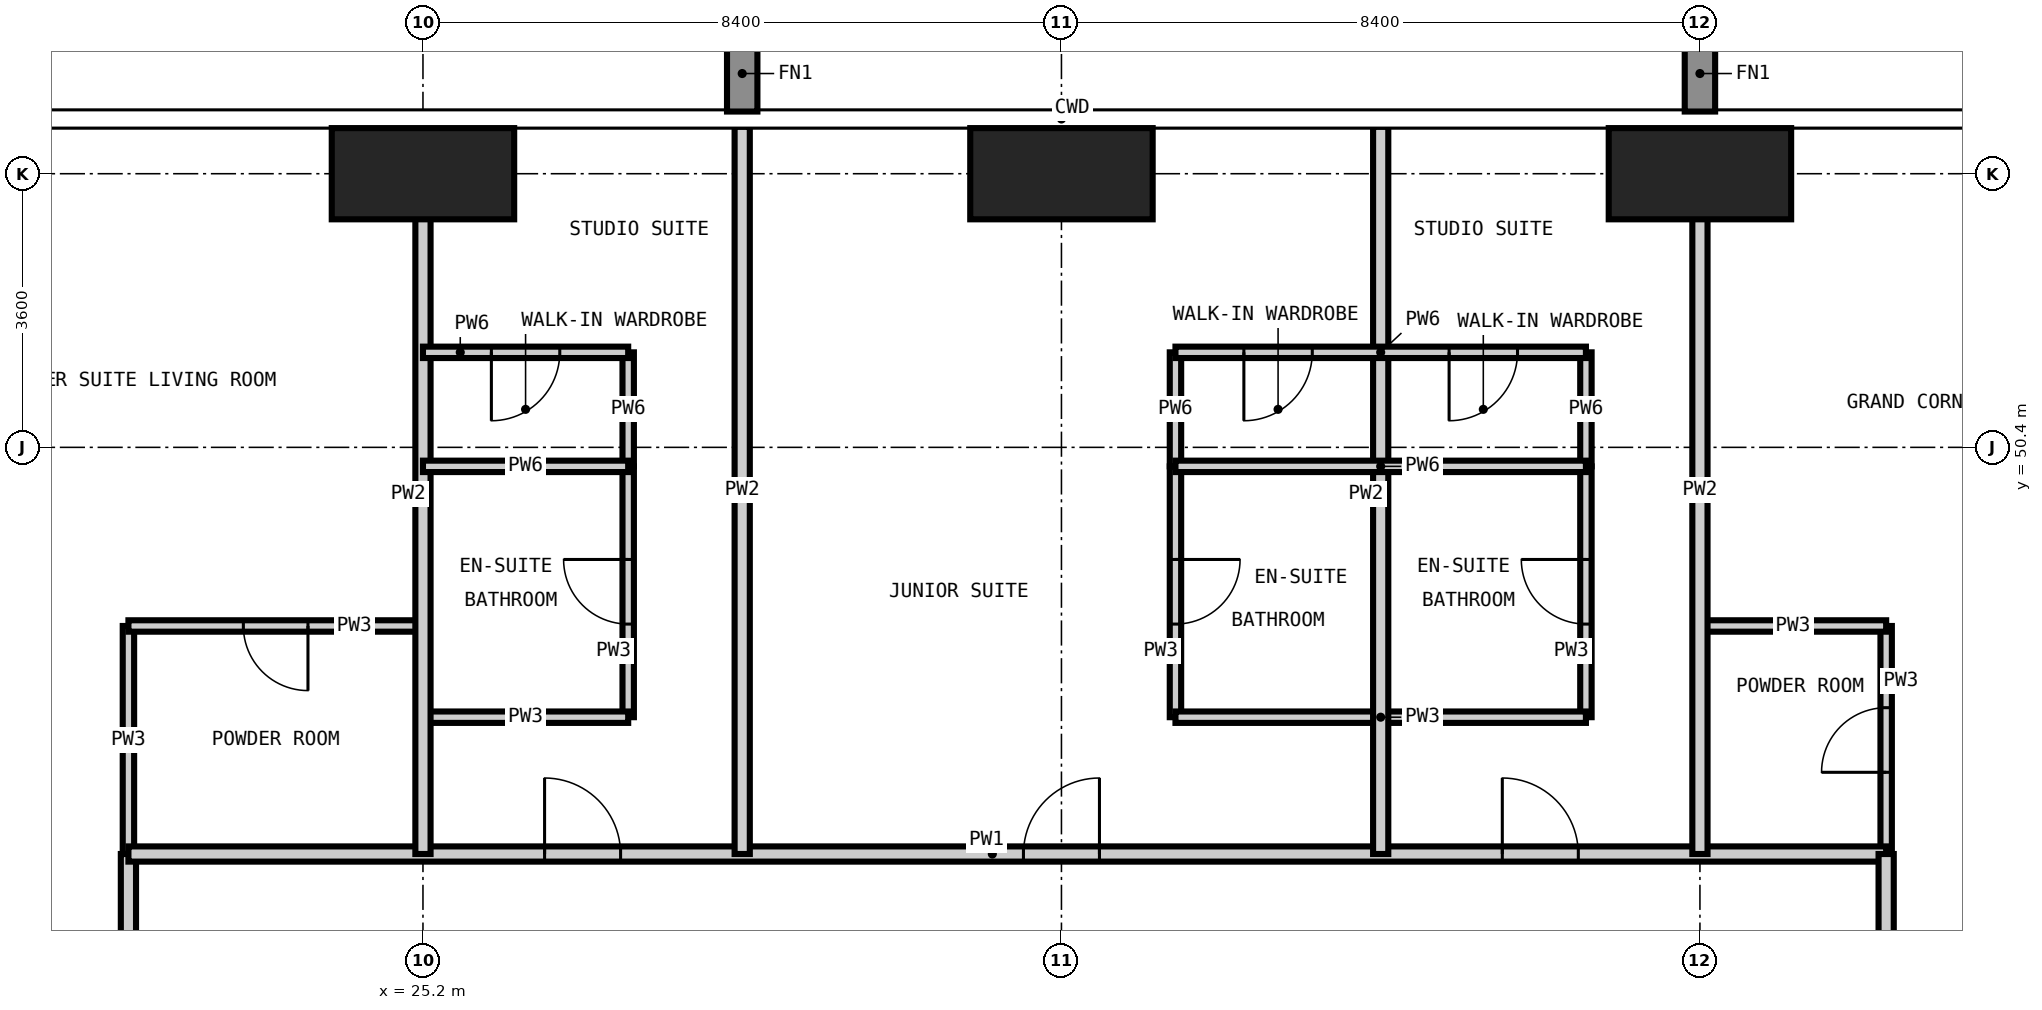
"""IFC4 building model, lengths in metres.
Left out: names, types, materials, properties, quantities, classifications, styles, units other than length and angle.
Written with IfcOpenShell. Run it as: python <this file> out.ifc"""

import sys

from ifc_helpers import new_model, si_unit, direction, frame, frame_2d, origin, origin_2d, place, context, subcontext, project, spatial, rectangle, extrude, element, fill, save


model = new_model("IFC4")
c1 = context("Model", 3, precision=1e-05, world=origin(), true_north=direction((0.0, 1.0)))
c2 = subcontext(c1, "Body", "Model", "MODEL_VIEW")
j1 = project(units=[si_unit("LENGTHUNIT", "METRE"), si_unit("PLANEANGLEUNIT", "RADIAN")], contexts=[c1])
p1 = place(None, origin())
s1 = spatial("IfcSite", under=j1, at=p1, CompositionType="ELEMENT")
p2 = place(p1, origin())
s2 = spatial("IfcBuilding", under=s1, at=p2, CompositionType="ELEMENT")
p3 = place(p2, frame((0.0, 0.0, 229.5)))
s3 = spatial("IfcBuildingStorey", under=s2, at=p3, CompositionType="ELEMENT", Elevation=229.5)
for number, where, z_axis, x_axis in (
    (1, (25.2, 54.0, -0.35), (0.0, 0.0, 1.0), (1.0, 0.0, 0.0)),
    (2, (33.6, 54.0, -0.35), (0.0, 0.0, 1.0), (1.0, 0.0, 0.0)),
    (3, (42.0, 54.0, -0.35), (0.0, 0.0, 1.0), (1.0, 0.0, 0.0)),
):
    element("IfcColumn", number, at=place(p3, frame(where, z_axis=z_axis, x_axis=x_axis)), inside=s3, PredefinedType="COLUMN", context=c2, shape_type="SweptSolid", body=[
        extrude(rectangle(XDim=2.4, YDim=1.2, at=origin_2d()), origin(), (0.0, 0.0, 1.0), 3.9),
    ])
p4 = place(p3, frame((21.325, 45.05, 0.0), z_axis=(0.0, 0.0, 1.0), x_axis=(0.0, 1.0, 0.0)))
e4 = element("IfcWall", 4, at=p4, inside=s3, PredefinedType="PARTITIONING", context=c2, shape_type="SweptSolid", body=[
    extrude(rectangle(XDim=3.0, YDim=0.15, at=frame_2d((1.5, 0.0))), origin(), (0.0, 0.0, 1.0), 3.55),
])
p5 = place(p3, frame((27.9, 46.85, 0.0), z_axis=(0.0, 0.0, 1.0), x_axis=(0.0, 1.0, 0.0)))
e5 = element("IfcWall", 5, at=p5, inside=s3, PredefinedType="PARTITIONING", context=c2, shape_type="SweptSolid", body=[
    extrude(rectangle(XDim=3.3, YDim=0.15, at=frame_2d((1.65, 0.0))), origin(), (0.0, 0.0, 1.0), 3.55),
])
p6 = place(p5, frame((1.225, 0.0, 0.0)))
e6 = element("IfcOpeningElement", 6, at=p6, cuts=e5, PredefinedType="OPENING", context=c2, shape_type="SweptSolid", body=[
    extrude(rectangle(XDim=0.85, YDim=2.1, at=frame_2d((0.425, 1.05))), frame((0.0, 0.085, 0.0), z_axis=(0.0, -1.0, 0.0), x_axis=(1.0, 0.0, 0.0)), (0.0, 0.0, 1.0), 0.17),
])
p7 = place(p3, frame((35.1, 46.85, 0.0), z_axis=(0.0, 0.0, 1.0), x_axis=(0.0, 1.0, 0.0)))
e7 = element("IfcWall", 7, at=p7, inside=s3, PredefinedType="PARTITIONING", context=c2, shape_type="SweptSolid", body=[
    extrude(rectangle(XDim=3.3, YDim=0.15, at=frame_2d((1.65, 0.0))), origin(), (0.0, 0.0, 1.0), 3.55),
])
p8 = place(p7, frame((1.225, 0.0, 0.0)))
e8 = element("IfcOpeningElement", 8, at=p8, cuts=e7, PredefinedType="OPENING", context=c2, shape_type="SweptSolid", body=[
    extrude(rectangle(XDim=0.85, YDim=2.1, at=frame_2d((0.425, 1.05))), frame((0.0, 0.085, 0.0), z_axis=(0.0, -1.0, 0.0), x_axis=(1.0, 0.0, 0.0)), (0.0, 0.0, 1.0), 0.17),
])
p9 = place(p3, frame((40.5, 46.85, 0.0), z_axis=(0.0, 0.0, 1.0), x_axis=(0.0, 1.0, 0.0)))
e9 = element("IfcWall", 9, at=p9, inside=s3, PredefinedType="PARTITIONING", context=c2, shape_type="SweptSolid", body=[
    extrude(rectangle(XDim=3.3, YDim=0.15, at=frame_2d((1.65, 0.0))), origin(), (0.0, 0.0, 1.0), 3.55),
])
p10 = place(p9, frame((1.225, 0.0, 0.0)))
e10 = element("IfcOpeningElement", 10, at=p10, cuts=e9, PredefinedType="OPENING", context=c2, shape_type="SweptSolid", body=[
    extrude(rectangle(XDim=0.85, YDim=2.1, at=frame_2d((0.425, 1.05))), frame((0.0, 0.085, 0.0), z_axis=(0.0, -1.0, 0.0), x_axis=(1.0, 0.0, 0.0)), (0.0, 0.0, 1.0), 0.17),
])
p11 = place(p3, frame((44.45, 45.05, 0.0), z_axis=(0.0, 0.0, 1.0), x_axis=(0.0, 1.0, 0.0)))
e11 = element("IfcWall", 11, at=p11, inside=s3, PredefinedType="PARTITIONING", context=c2, shape_type="SweptSolid", body=[
    extrude(rectangle(XDim=3.0, YDim=0.15, at=frame_2d((1.5, 0.0))), origin(), (0.0, 0.0, 1.0), 3.55),
])
p12 = place(p11, frame((1.075, 0.0, 0.0)))
e12 = element("IfcOpeningElement", 12, at=p12, cuts=e11, PredefinedType="OPENING", context=c2, shape_type="SweptSolid", body=[
    extrude(rectangle(XDim=0.85, YDim=2.1, at=frame_2d((0.425, 1.05))), frame((0.0, 0.085, 0.0), z_axis=(0.0, -1.0, 0.0), x_axis=(1.0, 0.0, 0.0)), (0.0, 0.0, 1.0), 0.17),
])
p13 = place(p3, frame((25.2, 46.85, 0.0), z_axis=(0.0, 0.0, 1.0), x_axis=(1.0, 0.0, 0.0)))
e13 = element("IfcWall", 13, at=p13, inside=s3, PredefinedType="PARTITIONING", context=c2, shape_type="SweptSolid", body=[
    extrude(rectangle(XDim=2.7, YDim=0.15, at=frame_2d((1.35, 0.0))), origin(), (0.0, 0.0, 1.0), 3.55),
])
p14 = place(p3, frame((35.1, 46.85, 0.0), z_axis=(0.0, 0.0, 1.0), x_axis=(1.0, 0.0, 0.0)))
e14 = element("IfcWall", 14, at=p14, inside=s3, PredefinedType="PARTITIONING", context=c2, shape_type="SweptSolid", body=[
    extrude(rectangle(XDim=5.4, YDim=0.15, at=frame_2d((2.7, 0.0))), origin(), (0.0, 0.0, 1.0), 3.55),
])
p15 = place(p3, frame((21.325, 48.05, 0.0), z_axis=(0.0, 0.0, 1.0), x_axis=(1.0, 0.0, 0.0)))
e15 = element("IfcWall", 15, at=p15, inside=s3, PredefinedType="PARTITIONING", context=c2, shape_type="SweptSolid", body=[
    extrude(rectangle(XDim=3.875, YDim=0.15, at=frame_2d((1.938, 0.0))), origin(), (0.0, 0.0, 1.0), 3.55),
])
p16 = place(p15, frame((1.512, 0.0, 0.0)))
e16 = element("IfcOpeningElement", 16, at=p16, cuts=e15, PredefinedType="OPENING", context=c2, shape_type="SweptSolid", body=[
    extrude(rectangle(XDim=0.85, YDim=2.1, at=frame_2d((0.425, 1.05))), frame((0.0, 0.085, 0.0), z_axis=(0.0, -1.0, 0.0), x_axis=(1.0, 0.0, 0.0)), (0.0, 0.0, 1.0), 0.17),
])
p17 = place(p3, frame((42.0, 48.05, 0.0), z_axis=(0.0, 0.0, 1.0), x_axis=(1.0, 0.0, 0.0)))
e17 = element("IfcWall", 17, at=p17, inside=s3, PredefinedType="PARTITIONING", context=c2, shape_type="SweptSolid", body=[
    extrude(rectangle(XDim=2.45, YDim=0.15, at=frame_2d((1.225, 0.0))), origin(), (0.0, 0.0, 1.0), 3.55),
])
p18 = place(p3, frame((21.325, 13.15, 0.0), z_axis=(0.0, 0.0, 1.0), x_axis=(0.0, 1.0, 0.0)))
e18 = element("IfcWall", 18, at=p18, inside=s3, PredefinedType="PARTITIONING", context=c2, shape_type="SweptSolid", body=[
    extrude(rectangle(XDim=31.9, YDim=0.2, at=frame_2d((15.95, 0.0))), origin(), (0.0, 0.0, 1.0), 3.55),
])
p19 = place(p18, frame((6.15, 0.0, 0.0)))
e19 = element("IfcOpeningElement", 19, at=p19, cuts=e18, PredefinedType="OPENING", context=c2, shape_type="SweptSolid", body=[
    extrude(rectangle(XDim=1.0, YDim=2.2, at=frame_2d((0.5, 1.1))), frame((0.0, 0.11, 0.0), z_axis=(0.0, -1.0, 0.0), x_axis=(1.0, 0.0, 0.0)), (0.0, 0.0, 1.0), 0.22),
])
p20 = place(p18, frame((16.95, 0.0, 0.0)))
e20 = element("IfcOpeningElement", 20, at=p20, cuts=e18, PredefinedType="OPENING", context=c2, shape_type="SweptSolid", body=[
    extrude(rectangle(XDim=1.0, YDim=2.2, at=frame_2d((0.5, 1.1))), frame((0.0, 0.11, 0.0), z_axis=(0.0, -1.0, 0.0), x_axis=(1.0, 0.0, 0.0)), (0.0, 0.0, 1.0), 0.22),
])
p21 = place(p18, frame((22.95, 0.0, 0.0)))
e21 = element("IfcOpeningElement", 21, at=p21, cuts=e18, PredefinedType="OPENING", context=c2, shape_type="SweptSolid", body=[
    extrude(rectangle(XDim=1.0, YDim=2.2, at=frame_2d((0.5, 1.1))), frame((0.0, 0.11, 0.0), z_axis=(0.0, -1.0, 0.0), x_axis=(1.0, 0.0, 0.0)), (0.0, 0.0, 1.0), 0.22),
])
p22 = place(p18, frame((1.325, 0.0, 0.0)))
e22 = element("IfcOpeningElement", 22, at=p22, cuts=e18, PredefinedType="OPENING", context=c2, shape_type="SweptSolid", body=[
    extrude(rectangle(XDim=1.0, YDim=2.2, at=frame_2d((0.5, 1.1))), frame((0.0, 0.11, 0.0), z_axis=(0.0, -1.0, 0.0), x_axis=(1.0, 0.0, 0.0)), (0.0, 0.0, 1.0), 0.22),
])
p23 = place(p18, frame((29.875, 0.0, 0.0)))
e23 = element("IfcOpeningElement", 23, at=p23, cuts=e18, PredefinedType="OPENING", context=c2, shape_type="SweptSolid", body=[
    extrude(rectangle(XDim=1.0, YDim=2.2, at=frame_2d((0.5, 1.1))), frame((0.0, 0.11, 0.0), z_axis=(0.0, -1.0, 0.0), x_axis=(1.0, 0.0, 0.0)), (0.0, 0.0, 1.0), 0.22),
])
p24 = place(p3, frame((21.325, 45.05, 0.0), z_axis=(0.0, 0.0, 1.0), x_axis=(1.0, 0.0, 0.0)))
e24 = element("IfcWall", 24, at=p24, inside=s3, PredefinedType="PARTITIONING", context=c2, shape_type="SweptSolid", body=[
    extrude(rectangle(XDim=23.125, YDim=0.2, at=frame_2d((11.562, 0.0))), origin(), (0.0, 0.0, 1.0), 3.55),
])
p25 = place(p24, frame((5.475, 0.0, 0.0)))
e25 = element("IfcOpeningElement", 25, at=p25, cuts=e24, PredefinedType="OPENING", context=c2, shape_type="SweptSolid", body=[
    extrude(rectangle(XDim=1.0, YDim=2.2, at=frame_2d((0.5, 1.1))), frame((0.0, 0.11, 0.0), z_axis=(0.0, -1.0, 0.0), x_axis=(1.0, 0.0, 0.0)), (0.0, 0.0, 1.0), 0.22),
])
p26 = place(p24, frame((11.775, 0.0, 0.0)))
e26 = element("IfcOpeningElement", 26, at=p26, cuts=e24, PredefinedType="OPENING", context=c2, shape_type="SweptSolid", body=[
    extrude(rectangle(XDim=1.0, YDim=2.2, at=frame_2d((0.5, 1.1))), frame((0.0, 0.11, 0.0), z_axis=(0.0, -1.0, 0.0), x_axis=(1.0, 0.0, 0.0)), (0.0, 0.0, 1.0), 0.22),
])
p27 = place(p24, frame((18.075, 0.0, 0.0)))
e27 = element("IfcOpeningElement", 27, at=p27, cuts=e24, PredefinedType="OPENING", context=c2, shape_type="SweptSolid", body=[
    extrude(rectangle(XDim=1.0, YDim=2.2, at=frame_2d((0.5, 1.1))), frame((0.0, 0.11, 0.0), z_axis=(0.0, -1.0, 0.0), x_axis=(1.0, 0.0, 0.0)), (0.0, 0.0, 1.0), 0.22),
])
p28 = place(p3, frame((44.45, 45.05, 0.0), z_axis=(0.0, 0.0, 1.0), x_axis=(0.0, -1.0, 0.0)))
e28 = element("IfcWall", 28, at=p28, inside=s3, PredefinedType="PARTITIONING", context=c2, shape_type="SweptSolid", body=[
    extrude(rectangle(XDim=15.65, YDim=0.2, at=frame_2d((7.825, 0.0))), origin(), (0.0, 0.0, 1.0), 3.55),
])
p29 = place(p28, frame((5.55, 0.0, 0.0)))
e29 = element("IfcOpeningElement", 29, at=p29, cuts=e28, PredefinedType="OPENING", context=c2, shape_type="SweptSolid", body=[
    extrude(rectangle(XDim=1.0, YDim=2.2, at=frame_2d((0.5, 1.1))), frame((0.0, 0.11, 0.0), z_axis=(0.0, -1.0, 0.0), x_axis=(1.0, 0.0, 0.0)), (0.0, 0.0, 1.0), 0.22),
])
p30 = place(p28, frame((1.025, 0.0, 0.0)))
e30 = element("IfcOpeningElement", 30, at=p30, cuts=e28, PredefinedType="OPENING", context=c2, shape_type="SweptSolid", body=[
    extrude(rectangle(XDim=1.0, YDim=2.2, at=frame_2d((0.5, 1.1))), frame((0.0, 0.11, 0.0), z_axis=(0.0, -1.0, 0.0), x_axis=(1.0, 0.0, 0.0)), (0.0, 0.0, 1.0), 0.22),
])
for number, where, z_axis, x_axis in (
    (31, (25.2, 45.05, 0.0), (0.0, 0.0, 1.0), (0.0, 1.0, 0.0)),
    (32, (29.4, 45.05, 0.0), (0.0, 0.0, 1.0), (0.0, 1.0, 0.0)),
    (33, (37.8, 45.05, 0.0), (0.0, 0.0, 1.0), (0.0, 1.0, 0.0)),
    (34, (42.0, 45.05, 0.0), (0.0, 0.0, 1.0), (0.0, 1.0, 0.0)),
):
    element("IfcWall", number, at=place(p3, frame(where, z_axis=z_axis, x_axis=x_axis)), inside=s3, PredefinedType="PARTITIONING", context=c2, shape_type="SweptSolid", body=[
        extrude(rectangle(XDim=9.568, YDim=0.2, at=frame_2d((4.784, 0.0))), origin(), (0.0, 0.0, 1.0), 3.55),
    ])
for number, where, z_axis, x_axis in (
    (35, (27.9, 50.15, 0.0), (0.0, 0.0, 1.0), (0.0, 1.0, 0.0)),
    (36, (35.1, 50.15, 0.0), (0.0, 0.0, 1.0), (0.0, 1.0, 0.0)),
    (37, (40.5, 50.15, 0.0), (0.0, 0.0, 1.0), (0.0, 1.0, 0.0)),
):
    element("IfcWall", number, at=place(p3, frame(where, z_axis=z_axis, x_axis=x_axis)), inside=s3, PredefinedType="PARTITIONING", context=c2, shape_type="SweptSolid", body=[
        extrude(rectangle(XDim=1.5, YDim=0.15, at=frame_2d((0.75, 0.0))), origin(), (0.0, 0.0, 1.0), 3.55),
    ])
p31 = place(p3, frame((25.2, 50.15, 0.0), z_axis=(0.0, 0.0, 1.0), x_axis=(1.0, 0.0, 0.0)))
e38 = element("IfcWall", 38, at=p31, inside=s3, PredefinedType="PARTITIONING", context=c2, shape_type="SweptSolid", body=[
    extrude(rectangle(XDim=2.7, YDim=0.15, at=frame_2d((1.35, 0.0))), origin(), (0.0, 0.0, 1.0), 3.55),
])
p32 = place(p3, frame((35.1, 50.15, 0.0), z_axis=(0.0, 0.0, 1.0), x_axis=(1.0, 0.0, 0.0)))
e39 = element("IfcWall", 39, at=p32, inside=s3, PredefinedType="PARTITIONING", context=c2, shape_type="SweptSolid", body=[
    extrude(rectangle(XDim=5.4, YDim=0.15, at=frame_2d((2.7, 0.0))), origin(), (0.0, 0.0, 1.0), 3.55),
])
p33 = place(p3, frame((25.2, 51.65, 0.0), z_axis=(0.0, 0.0, 1.0), x_axis=(1.0, 0.0, 0.0)))
e40 = element("IfcWall", 40, at=p33, inside=s3, PredefinedType="PARTITIONING", context=c2, shape_type="SweptSolid", body=[
    extrude(rectangle(XDim=2.7, YDim=0.15, at=frame_2d((1.35, 0.0))), origin(), (0.0, 0.0, 1.0), 3.55),
])
p34 = place(p33, frame((0.9, 0.0, 0.0)))
e41 = element("IfcOpeningElement", 41, at=p34, cuts=e40, PredefinedType="OPENING", context=c2, shape_type="SweptSolid", body=[
    extrude(rectangle(XDim=0.9, YDim=2.1, at=frame_2d((0.45, 1.05))), frame((0.0, 0.085, 0.0), z_axis=(0.0, -1.0, 0.0), x_axis=(1.0, 0.0, 0.0)), (0.0, 0.0, 1.0), 0.17),
])
p35 = place(p3, frame((35.1, 51.65, 0.0), z_axis=(0.0, 0.0, 1.0), x_axis=(1.0, 0.0, 0.0)))
e42 = element("IfcWall", 42, at=p35, inside=s3, PredefinedType="PARTITIONING", context=c2, shape_type="SweptSolid", body=[
    extrude(rectangle(XDim=5.4, YDim=0.15, at=frame_2d((2.7, 0.0))), origin(), (0.0, 0.0, 1.0), 3.55),
])
p36 = place(p35, frame((0.9, 0.0, 0.0)))
e43 = element("IfcOpeningElement", 43, at=p36, cuts=e42, PredefinedType="OPENING", context=c2, shape_type="SweptSolid", body=[
    extrude(rectangle(XDim=0.9, YDim=2.1, at=frame_2d((0.45, 1.05))), frame((0.0, 0.085, 0.0), z_axis=(0.0, -1.0, 0.0), x_axis=(1.0, 0.0, 0.0)), (0.0, 0.0, 1.0), 0.17),
])
p37 = place(p35, frame((3.6, 0.0, 0.0)))
e44 = element("IfcOpeningElement", 44, at=p37, cuts=e42, PredefinedType="OPENING", context=c2, shape_type="SweptSolid", body=[
    extrude(rectangle(XDim=0.9, YDim=2.1, at=frame_2d((0.45, 1.05))), frame((0.0, 0.085, 0.0), z_axis=(0.0, -1.0, 0.0), x_axis=(1.0, 0.0, 0.0)), (0.0, 0.0, 1.0), 0.17),
])
p38 = place(p25, origin())
e45 = element("IfcDoor", 45, at=p38, inside=s3, OperationType="SINGLE_SWING_LEFT", PredefinedType="DOOR", context=c2, shape_type="SweptSolid", body=[
    extrude(rectangle(XDim=1.0, YDim=2.2, at=frame_2d((0.5, 1.1))), frame((0.0, 0.025, 0.0), z_axis=(0.0, -1.0, 0.0), x_axis=(1.0, 0.0, 0.0)), (0.0, 0.0, 1.0), 0.05),
])
fill(e25, e45)
p39 = place(p6, origin())
e46 = element("IfcDoor", 46, at=p39, inside=s3, OperationType="SINGLE_SWING_RIGHT", PredefinedType="DOOR", context=c2, shape_type="SweptSolid", body=[
    extrude(rectangle(XDim=0.85, YDim=2.1, at=frame_2d((0.425, 1.05))), frame((0.0, 0.025, 0.0), z_axis=(0.0, -1.0, 0.0), x_axis=(1.0, 0.0, 0.0)), (0.0, 0.0, 1.0), 0.05),
])
fill(e6, e46)
p40 = place(p34, frame((0.9, 0.0, 0.0), z_axis=(0.0, 0.0, 1.0), x_axis=(-1.0, 0.0, 0.0)))
e47 = element("IfcDoor", 47, at=p40, inside=s3, OperationType="SINGLE_SWING_RIGHT", PredefinedType="DOOR", context=c2, shape_type="SweptSolid", body=[
    extrude(rectangle(XDim=0.9, YDim=2.1, at=frame_2d((0.45, 1.05))), frame((0.0, 0.025, 0.0), z_axis=(0.0, -1.0, 0.0), x_axis=(1.0, 0.0, 0.0)), (0.0, 0.0, 1.0), 0.05),
])
fill(e41, e47)
p41 = place(p26, origin())
e48 = element("IfcDoor", 48, at=p41, inside=s3, OperationType="SINGLE_SWING_RIGHT", PredefinedType="DOOR", context=c2, shape_type="SweptSolid", body=[
    extrude(rectangle(XDim=1.0, YDim=2.2, at=frame_2d((0.5, 1.1))), frame((0.0, 0.025, 0.0), z_axis=(0.0, -1.0, 0.0), x_axis=(1.0, 0.0, 0.0)), (0.0, 0.0, 1.0), 0.05),
])
fill(e26, e48)
p42 = place(p8, frame((0.85, 0.0, 0.0), z_axis=(0.0, 0.0, 1.0), x_axis=(-1.0, 0.0, 0.0)))
e49 = element("IfcDoor", 49, at=p42, inside=s3, OperationType="SINGLE_SWING_LEFT", PredefinedType="DOOR", context=c2, shape_type="SweptSolid", body=[
    extrude(rectangle(XDim=0.85, YDim=2.1, at=frame_2d((0.425, 1.05))), frame((0.0, 0.025, 0.0), z_axis=(0.0, -1.0, 0.0), x_axis=(1.0, 0.0, 0.0)), (0.0, 0.0, 1.0), 0.05),
])
fill(e8, e49)
p43 = place(p36, frame((0.9, 0.0, 0.0), z_axis=(0.0, 0.0, 1.0), x_axis=(-1.0, 0.0, 0.0)))
e50 = element("IfcDoor", 50, at=p43, inside=s3, OperationType="SINGLE_SWING_RIGHT", PredefinedType="DOOR", context=c2, shape_type="SweptSolid", body=[
    extrude(rectangle(XDim=0.9, YDim=2.1, at=frame_2d((0.45, 1.05))), frame((0.0, 0.025, 0.0), z_axis=(0.0, -1.0, 0.0), x_axis=(1.0, 0.0, 0.0)), (0.0, 0.0, 1.0), 0.05),
])
fill(e43, e50)
p44 = place(p27, origin())
e51 = element("IfcDoor", 51, at=p44, inside=s3, OperationType="SINGLE_SWING_LEFT", PredefinedType="DOOR", context=c2, shape_type="SweptSolid", body=[
    extrude(rectangle(XDim=1.0, YDim=2.2, at=frame_2d((0.5, 1.1))), frame((0.0, 0.025, 0.0), z_axis=(0.0, -1.0, 0.0), x_axis=(1.0, 0.0, 0.0)), (0.0, 0.0, 1.0), 0.05),
])
fill(e27, e51)
p45 = place(p10, origin())
e52 = element("IfcDoor", 52, at=p45, inside=s3, OperationType="SINGLE_SWING_RIGHT", PredefinedType="DOOR", context=c2, shape_type="SweptSolid", body=[
    extrude(rectangle(XDim=0.85, YDim=2.1, at=frame_2d((0.425, 1.05))), frame((0.0, 0.025, 0.0), z_axis=(0.0, -1.0, 0.0), x_axis=(1.0, 0.0, 0.0)), (0.0, 0.0, 1.0), 0.05),
])
fill(e10, e52)
p46 = place(p37, frame((0.9, 0.0, 0.0), z_axis=(0.0, 0.0, 1.0), x_axis=(-1.0, 0.0, 0.0)))
e53 = element("IfcDoor", 53, at=p46, inside=s3, OperationType="SINGLE_SWING_RIGHT", PredefinedType="DOOR", context=c2, shape_type="SweptSolid", body=[
    extrude(rectangle(XDim=0.9, YDim=2.1, at=frame_2d((0.45, 1.05))), frame((0.0, 0.025, 0.0), z_axis=(0.0, -1.0, 0.0), x_axis=(1.0, 0.0, 0.0)), (0.0, 0.0, 1.0), 0.05),
])
fill(e44, e53)
p47 = place(p12, origin())
e54 = element("IfcDoor", 54, at=p47, inside=s3, OperationType="SINGLE_SWING_LEFT", PredefinedType="DOOR", context=c2, shape_type="SweptSolid", body=[
    extrude(rectangle(XDim=0.85, YDim=2.1, at=frame_2d((0.425, 1.05))), frame((0.0, 0.025, 0.0), z_axis=(0.0, -1.0, 0.0), x_axis=(1.0, 0.0, 0.0)), (0.0, 0.0, 1.0), 0.05),
])
fill(e12, e54)
p48 = place(p16, frame((0.85, 0.0, 0.0), z_axis=(0.0, 0.0, 1.0), x_axis=(-1.0, 0.0, 0.0)))
e55 = element("IfcDoor", 55, at=p48, inside=s3, OperationType="SINGLE_SWING_LEFT", PredefinedType="DOOR", context=c2, shape_type="SweptSolid", body=[
    extrude(rectangle(XDim=0.85, YDim=2.1, at=frame_2d((0.425, 1.05))), frame((0.0, 0.025, 0.0), z_axis=(0.0, -1.0, 0.0), x_axis=(1.0, 0.0, 0.0)), (0.0, 0.0, 1.0), 0.05),
])
fill(e16, e55)
save(model, sys.argv[1])
